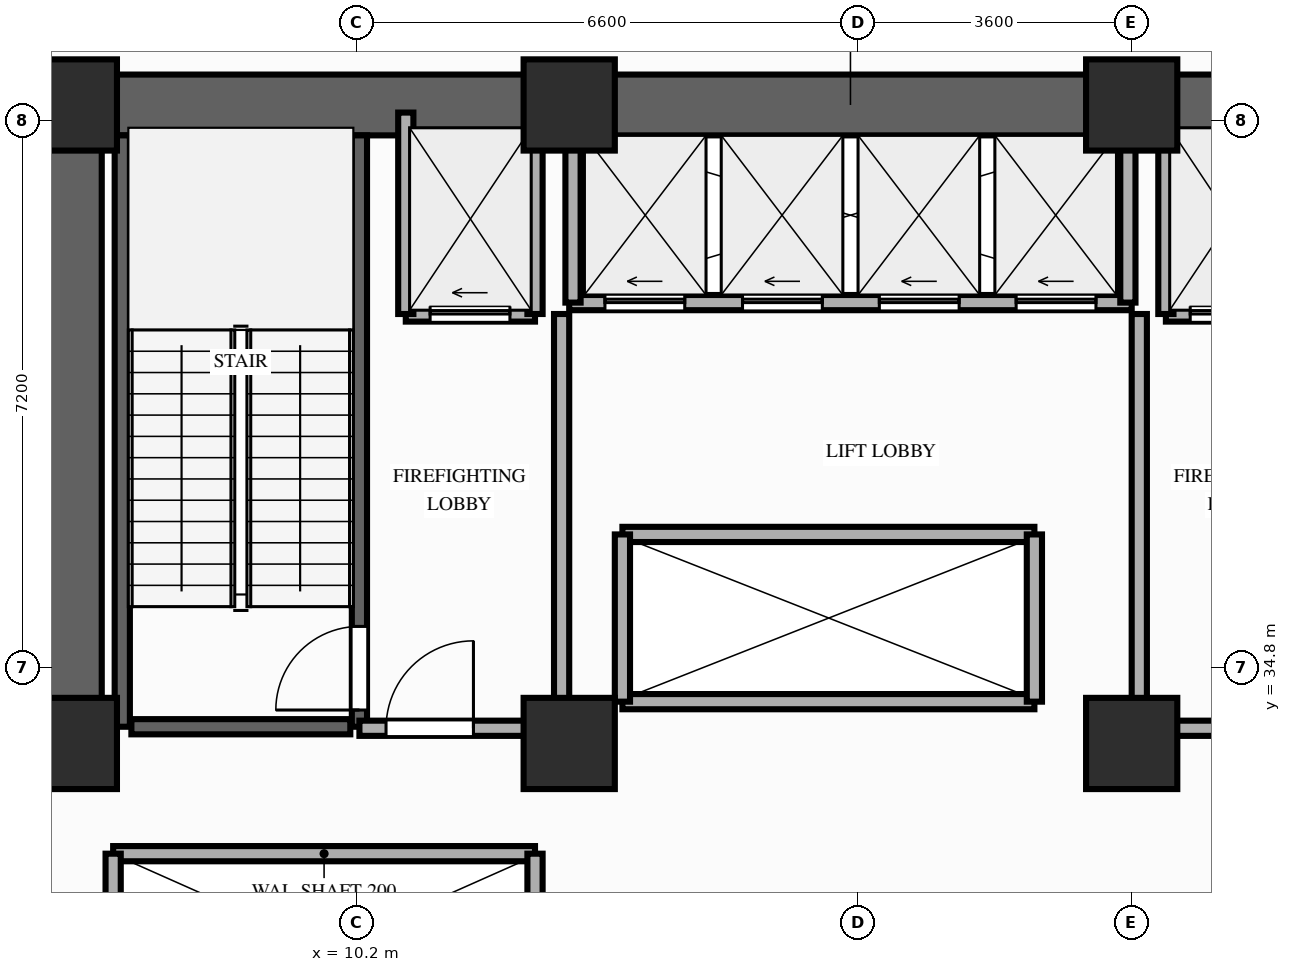
"""IFC4 building model, lengths in metres.
Left out: names, types, materials, properties, quantities, classifications, styles, units other than length and angle.
Written with IfcOpenShell. Run it as: python <this file> out.ifc"""

import sys

from ifc_helpers import new_model, si_unit, direction, frame, frame_2d, origin, origin_2d, place, context, subcontext, project, spatial, rectangle, extrude, element, fill, save


model = new_model("IFC4")
c1 = context("Model", 3, precision=1e-05, world=origin(), true_north=direction((0.0, 1.0)))
c2 = subcontext(c1, "Body", "Model", "MODEL_VIEW")
j1 = project(units=[si_unit("LENGTHUNIT", "METRE"), si_unit("PLANEANGLEUNIT", "RADIAN")], contexts=[c1])
p1 = place(None, origin())
s1 = spatial("IfcSite", under=j1, at=p1, CompositionType="ELEMENT")
p2 = place(p1, origin())
s2 = spatial("IfcBuilding", under=s1, at=p2, CompositionType="ELEMENT")
p3 = place(p2, frame((0.0, 0.0, 21.8)))
s3 = spatial("IfcBuildingStorey", under=s2, at=p3, CompositionType="ELEMENT", Elevation=21.8)
for number, where, z_axis, x_axis in (
    (1, (6.45, 33.8, 0.0), (0.0, 0.0, 1.0), (1.0, 0.0, 0.0)),
    (2, (13.0, 33.8, 0.0), (0.0, 0.0, 1.0), (1.0, 0.0, 0.0)),
    (3, (20.4, 33.8, 0.0), (0.0, 0.0, 1.0), (1.0, 0.0, 0.0)),
    (4, (6.45, 42.2, 0.0), (0.0, 0.0, 1.0), (1.0, 0.0, 0.0)),
    (5, (13.0, 42.2, 0.0), (0.0, 0.0, 1.0), (1.0, 0.0, 0.0)),
    (6, (20.4, 42.2, 0.0), (0.0, 0.0, 1.0), (1.0, 0.0, 0.0)),
):
    element("IfcColumn", number, at=place(p3, frame(where, z_axis=z_axis, x_axis=x_axis)), inside=s3, PredefinedType="COLUMN", context=c2, shape_type="SweptSolid", body=[
        extrude(rectangle(XDim=1.2, YDim=1.2, at=origin_2d()), origin(), (0.0, 0.0, 1.0), 4.6),
    ])
p4 = place(p3, frame((6.45, 42.2, 0.0), z_axis=(0.0, 0.0, 1.0), x_axis=(1.0, 0.0, 0.0)))
e7 = element("IfcWall", 7, at=p4, inside=s3, PredefinedType="SHEAR", context=c2, shape_type="SweptSolid", body=[
    extrude(rectangle(XDim=20.45, YDim=0.8, at=frame_2d((10.225, 0.0))), origin(), (0.0, 0.0, 1.0), 4.36),
])
p5 = place(p3, frame((6.45, 33.8, 0.0), z_axis=(0.0, 0.0, 1.0), x_axis=(0.0, 1.0, 0.0)))
e8 = element("IfcWall", 8, at=p5, inside=s3, PredefinedType="SHEAR", context=c2, shape_type="SweptSolid", body=[
    extrude(rectangle(XDim=7.95, YDim=0.8, at=frame_2d((3.975, 0.0))), origin(), (0.0, 0.0, 1.0), 4.36),
])
p6 = place(p3, frame((7.12, 34.02, 0.0), z_axis=(0.0, 0.0, 1.0), x_axis=(0.0, 1.0, 0.0)))
e9 = element("IfcWall", 9, at=p6, inside=s3, PredefinedType="SHEAR", context=c2, shape_type="SweptSolid", body=[
    extrude(rectangle(XDim=7.78, YDim=0.2, at=frame_2d((3.89, 0.0))), origin(), (0.0, 0.0, 1.0), 4.36),
])
p7 = place(p3, frame((10.24, 34.02, 0.0), z_axis=(0.0, 0.0, 1.0), x_axis=(0.0, 1.0, 0.0)))
e10 = element("IfcWall", 10, at=p7, inside=s3, PredefinedType="SHEAR", context=c2, shape_type="SweptSolid", body=[
    extrude(rectangle(XDim=7.78, YDim=0.2, at=frame_2d((3.89, 0.0))), origin(), (0.0, 0.0, 1.0), 4.36),
])
p8 = place(p7, frame((0.22, 0.0, 0.0)))
e11 = element("IfcOpeningElement", 11, at=p8, cuts=e10, PredefinedType="OPENING", context=c2, shape_type="SweptSolid", body=[
    extrude(rectangle(XDim=1.1, YDim=2.15, at=frame_2d((0.55, 1.075))), frame((0.0, 0.11, 0.0), z_axis=(0.0, -1.0, 0.0), x_axis=(1.0, 0.0, 0.0)), (0.0, 0.0, 1.0), 0.22),
])
p9 = place(p3, frame((7.24, 34.02, 0.0), z_axis=(0.0, 0.0, 1.0), x_axis=(1.0, 0.0, 0.0)))
e12 = element("IfcWall", 12, at=p9, inside=s3, PredefinedType="SHEAR", context=c2, shape_type="SweptSolid", body=[
    extrude(rectangle(XDim=2.88, YDim=0.2, at=frame_2d((1.44, 0.0))), origin(), (0.0, 0.0, 1.0), 4.36),
])
p10 = place(p3, frame((7.0, 32.35, 0.0), z_axis=(0.0, 0.0, 1.0), x_axis=(1.0, 0.0, 0.0)))
e13 = element("IfcWall", 13, at=p10, inside=s3, PredefinedType="MOVABLE", context=c2, shape_type="SweptSolid", body=[
    extrude(rectangle(XDim=5.55, YDim=0.2, at=frame_2d((2.775, 0.0))), origin(), (0.0, 0.0, 1.0), 4.36),
])
for number, where, z_axis, x_axis in (
    (14, (7.0, 29.85, 0.0), (0.0, 0.0, 1.0), (0.0, 1.0, 0.0)),
    (15, (12.55, 29.85, 0.0), (0.0, 0.0, 1.0), (0.0, 1.0, 0.0)),
):
    element("IfcWall", number, at=place(p3, frame(where, z_axis=z_axis, x_axis=x_axis)), inside=s3, PredefinedType="MOVABLE", context=c2, shape_type="SweptSolid", body=[
        extrude(rectangle(XDim=2.5, YDim=0.2, at=frame_2d((1.25, 0.0))), origin(), (0.0, 0.0, 1.0), 4.36),
    ])
p11 = place(p3, frame((10.85, 39.45, 0.0), z_axis=(0.0, 0.0, 1.0), x_axis=(1.0, 0.0, 0.0)))
e16 = element("IfcWall", 16, at=p11, inside=s3, PredefinedType="MOVABLE", context=c2, shape_type="SweptSolid", body=[
    extrude(rectangle(XDim=1.7, YDim=0.2, at=frame_2d((0.85, 0.0))), origin(), (0.0, 0.0, 1.0), 4.36),
])
p12 = place(p11, frame((0.32, 0.0, 0.0)))
e17 = element("IfcOpeningElement", 17, at=p12, cuts=e16, PredefinedType="OPENING", context=c2, shape_type="SweptSolid", body=[
    extrude(rectangle(XDim=1.05, YDim=2.15, at=frame_2d((0.525, 1.075))), frame((0.0, 0.11, 0.0), z_axis=(0.0, -1.0, 0.0), x_axis=(1.0, 0.0, 0.0)), (0.0, 0.0, 1.0), 0.22),
])
p13 = place(p3, frame((20.85, 39.45, 0.0), z_axis=(0.0, 0.0, 1.0), x_axis=(1.0, 0.0, 0.0)))
e18 = element("IfcWall", 18, at=p13, inside=s3, PredefinedType="MOVABLE", context=c2, shape_type="SweptSolid", body=[
    extrude(rectangle(XDim=1.7, YDim=0.2, at=frame_2d((0.85, 0.0))), origin(), (0.0, 0.0, 1.0), 4.36),
])
p14 = place(p13, frame((0.32, 0.0, 0.0)))
e19 = element("IfcOpeningElement", 19, at=p14, cuts=e18, PredefinedType="OPENING", context=c2, shape_type="SweptSolid", body=[
    extrude(rectangle(XDim=1.05, YDim=2.15, at=frame_2d((0.525, 1.075))), frame((0.0, 0.11, 0.0), z_axis=(0.0, -1.0, 0.0), x_axis=(1.0, 0.0, 0.0)), (0.0, 0.0, 1.0), 0.22),
])
for number, where, z_axis, x_axis in (
    (20, (10.85, 39.45, 0.0), (0.0, 0.0, 1.0), (0.0, 1.0, 0.0)),
    (21, (12.55, 39.45, 0.0), (0.0, 0.0, 1.0), (0.0, 1.0, 0.0)),
):
    element("IfcWall", number, at=place(p3, frame(where, z_axis=z_axis, x_axis=x_axis)), inside=s3, PredefinedType="MOVABLE", context=c2, shape_type="SweptSolid", body=[
        extrude(rectangle(XDim=2.65, YDim=0.2, at=frame_2d((1.325, 0.0))), origin(), (0.0, 0.0, 1.0), 3.74),
    ])
p15 = place(p3, frame((12.9, 34.0, 0.0), z_axis=(0.0, 0.0, 1.0), x_axis=(0.0, 1.0, 0.0)))
e22 = element("IfcWall", 22, at=p15, inside=s3, PredefinedType="PARTITIONING", context=c2, shape_type="SweptSolid", body=[
    extrude(rectangle(XDim=5.45, YDim=0.2, at=frame_2d((2.725, 0.0))), origin(), (0.0, 0.0, 1.0), 3.74),
])
p16 = place(p3, frame((10.24, 34.0, 0.0), z_axis=(0.0, 0.0, 1.0), x_axis=(1.0, 0.0, 0.0)))
e23 = element("IfcWall", 23, at=p16, inside=s3, PredefinedType="PARTITIONING", context=c2, shape_type="SweptSolid", body=[
    extrude(rectangle(XDim=2.66, YDim=0.2, at=frame_2d((1.33, 0.0))), origin(), (0.0, 0.0, 1.0), 3.74),
])
p17 = place(p16, frame((0.35, 0.0, 0.0)))
e24 = element("IfcOpeningElement", 24, at=p17, cuts=e23, PredefinedType="OPENING", context=c2, shape_type="SweptSolid", body=[
    extrude(rectangle(XDim=1.15, YDim=2.15, at=frame_2d((0.575, 1.075))), frame((0.0, 0.11, 0.0), z_axis=(0.0, -1.0, 0.0), x_axis=(1.0, 0.0, 0.0)), (0.0, 0.0, 1.0), 0.22),
])
p18 = place(p3, frame((20.85, 39.45, 0.0), z_axis=(0.0, 0.0, 1.0), x_axis=(0.0, 1.0, 0.0)))
e25 = element("IfcWall", 25, at=p18, inside=s3, PredefinedType="MOVABLE", context=c2, shape_type="SweptSolid", body=[
    extrude(rectangle(XDim=2.65, YDim=0.2, at=frame_2d((1.325, 0.0))), origin(), (0.0, 0.0, 1.0), 3.74),
])
p19 = place(p3, frame((20.5, 34.0, 0.0), z_axis=(0.0, 0.0, 1.0), x_axis=(0.0, 1.0, 0.0)))
e26 = element("IfcWall", 26, at=p19, inside=s3, PredefinedType="PARTITIONING", context=c2, shape_type="SweptSolid", body=[
    extrude(rectangle(XDim=5.45, YDim=0.2, at=frame_2d((2.725, 0.0))), origin(), (0.0, 0.0, 1.0), 3.74),
])
p20 = place(p3, frame((20.5, 34.0, 0.0), z_axis=(0.0, 0.0, 1.0), x_axis=(1.0, 0.0, 0.0)))
e27 = element("IfcWall", 27, at=p20, inside=s3, PredefinedType="PARTITIONING", context=c2, shape_type="SweptSolid", body=[
    extrude(rectangle(XDim=2.6, YDim=0.2, at=frame_2d((1.3, 0.0))), origin(), (0.0, 0.0, 1.0), 3.74),
])
p21 = place(p20, frame((1.05, 0.0, 0.0)))
e28 = element("IfcOpeningElement", 28, at=p21, cuts=e27, PredefinedType="OPENING", context=c2, shape_type="SweptSolid", body=[
    extrude(rectangle(XDim=1.15, YDim=2.15, at=frame_2d((0.575, 1.075))), frame((0.0, 0.11, 0.0), z_axis=(0.0, -1.0, 0.0), x_axis=(1.0, 0.0, 0.0)), (0.0, 0.0, 1.0), 0.22),
])
p22 = place(p3, frame((13.0, 39.6, 0.0), z_axis=(0.0, 0.0, 1.0), x_axis=(1.0, 0.0, 0.0)))
e29 = element("IfcWall", 29, at=p22, inside=s3, PredefinedType="MOVABLE", context=c2, shape_type="SweptSolid", body=[
    extrude(rectangle(XDim=7.4, YDim=0.2, at=frame_2d((3.7, 0.0))), origin(), (0.0, 0.0, 1.0), 4.36),
])
p23 = place(p22, frame((0.47, 0.0, 0.0)))
e30 = element("IfcOpeningElement", 30, at=p23, cuts=e29, PredefinedType="OPENING", context=c2, shape_type="SweptSolid", body=[
    extrude(rectangle(XDim=1.05, YDim=2.15, at=frame_2d((0.525, 1.075))), frame((0.0, 0.11, 0.0), z_axis=(0.0, -1.0, 0.0), x_axis=(1.0, 0.0, 0.0)), (0.0, 0.0, 1.0), 0.22),
])
p24 = place(p22, frame((2.28, 0.0, 0.0)))
e31 = element("IfcOpeningElement", 31, at=p24, cuts=e29, PredefinedType="OPENING", context=c2, shape_type="SweptSolid", body=[
    extrude(rectangle(XDim=1.05, YDim=2.15, at=frame_2d((0.525, 1.075))), frame((0.0, 0.11, 0.0), z_axis=(0.0, -1.0, 0.0), x_axis=(1.0, 0.0, 0.0)), (0.0, 0.0, 1.0), 0.22),
])
p25 = place(p22, frame((4.08, 0.0, 0.0)))
e32 = element("IfcOpeningElement", 32, at=p25, cuts=e29, PredefinedType="OPENING", context=c2, shape_type="SweptSolid", body=[
    extrude(rectangle(XDim=1.05, YDim=2.15, at=frame_2d((0.525, 1.075))), frame((0.0, 0.11, 0.0), z_axis=(0.0, -1.0, 0.0), x_axis=(1.0, 0.0, 0.0)), (0.0, 0.0, 1.0), 0.22),
])
p26 = place(p22, frame((5.88, 0.0, 0.0)))
e33 = element("IfcOpeningElement", 33, at=p26, cuts=e29, PredefinedType="OPENING", context=c2, shape_type="SweptSolid", body=[
    extrude(rectangle(XDim=1.05, YDim=2.15, at=frame_2d((0.525, 1.075))), frame((0.0, 0.11, 0.0), z_axis=(0.0, -1.0, 0.0), x_axis=(1.0, 0.0, 0.0)), (0.0, 0.0, 1.0), 0.22),
])
for number, where, z_axis, x_axis in (
    (34, (13.05, 39.6, 0.0), (0.0, 0.0, 1.0), (0.0, 1.0, 0.0)),
    (35, (20.35, 39.6, 0.0), (0.0, 0.0, 1.0), (0.0, 1.0, 0.0)),
):
    element("IfcWall", number, at=place(p3, frame(where, z_axis=z_axis, x_axis=x_axis)), inside=s3, PredefinedType="MOVABLE", context=c2, shape_type="SweptSolid", body=[
        extrude(rectangle(XDim=2.18, YDim=0.2, at=frame_2d((1.09, 0.0))), origin(), (0.0, 0.0, 1.0), 4.36),
    ])
for number, where, z_axis, x_axis in (
    (36, (13.7, 34.35, 0.0), (0.0, 0.0, 1.0), (1.0, 0.0, 0.0)),
    (37, (13.7, 36.55, 0.0), (0.0, 0.0, 1.0), (1.0, 0.0, 0.0)),
):
    element("IfcWall", number, at=place(p3, frame(where, z_axis=z_axis, x_axis=x_axis)), inside=s3, PredefinedType="MOVABLE", context=c2, shape_type="SweptSolid", body=[
        extrude(rectangle(XDim=5.42, YDim=0.2, at=frame_2d((2.71, 0.0))), origin(), (0.0, 0.0, 1.0), 4.36),
    ])
for number, where, z_axis, x_axis in (
    (38, (13.7, 34.35, 0.0), (0.0, 0.0, 1.0), (0.0, 1.0, 0.0)),
    (39, (19.12, 34.35, 0.0), (0.0, 0.0, 1.0), (0.0, 1.0, 0.0)),
):
    element("IfcWall", number, at=place(p3, frame(where, z_axis=z_axis, x_axis=x_axis)), inside=s3, PredefinedType="MOVABLE", context=c2, shape_type="SweptSolid", body=[
        extrude(rectangle(XDim=2.2, YDim=0.2, at=frame_2d((1.1, 0.0))), origin(), (0.0, 0.0, 1.0), 4.36),
    ])
p27 = place(p8, origin())
e40 = element("IfcDoor", 40, at=p27, inside=s3, OperationType="SINGLE_SWING_LEFT", PredefinedType="DOOR", context=c2, shape_type="SweptSolid", body=[
    extrude(rectangle(XDim=1.1, YDim=2.15, at=frame_2d((0.55, 1.075))), frame((0.0, 0.025, 0.0), z_axis=(0.0, -1.0, 0.0), x_axis=(1.0, 0.0, 0.0)), (0.0, 0.0, 1.0), 0.05),
])
fill(e11, e40)
p28 = place(p12, origin())
e41 = element("IfcDoor", 41, at=p28, inside=s3, OperationType="SLIDING_TO_LEFT", PredefinedType="DOOR", context=c2, shape_type="SweptSolid", body=[
    extrude(rectangle(XDim=1.05, YDim=2.15, at=frame_2d((0.525, 1.075))), frame((0.0, 0.025, 0.0), z_axis=(0.0, -1.0, 0.0), x_axis=(1.0, 0.0, 0.0)), (0.0, 0.0, 1.0), 0.05),
])
fill(e17, e41)
p29 = place(p14, origin())
e42 = element("IfcDoor", 42, at=p29, inside=s3, OperationType="SLIDING_TO_LEFT", PredefinedType="DOOR", context=c2, shape_type="SweptSolid", body=[
    extrude(rectangle(XDim=1.05, YDim=2.15, at=frame_2d((0.525, 1.075))), frame((0.0, 0.025, 0.0), z_axis=(0.0, -1.0, 0.0), x_axis=(1.0, 0.0, 0.0)), (0.0, 0.0, 1.0), 0.05),
])
fill(e19, e42)
p30 = place(p17, origin())
e43 = element("IfcDoor", 43, at=p30, inside=s3, OperationType="SINGLE_SWING_RIGHT", PredefinedType="DOOR", context=c2, shape_type="SweptSolid", body=[
    extrude(rectangle(XDim=1.15, YDim=2.15, at=frame_2d((0.575, 1.075))), frame((0.0, 0.025, 0.0), z_axis=(0.0, -1.0, 0.0), x_axis=(1.0, 0.0, 0.0)), (0.0, 0.0, 1.0), 0.05),
])
fill(e24, e43)
p31 = place(p23, origin())
e44 = element("IfcDoor", 44, at=p31, inside=s3, OperationType="SLIDING_TO_LEFT", PredefinedType="DOOR", context=c2, shape_type="SweptSolid", body=[
    extrude(rectangle(XDim=1.05, YDim=2.15, at=frame_2d((0.525, 1.075))), frame((0.0, 0.025, 0.0), z_axis=(0.0, -1.0, 0.0), x_axis=(1.0, 0.0, 0.0)), (0.0, 0.0, 1.0), 0.05),
])
fill(e30, e44)
p32 = place(p24, origin())
e45 = element("IfcDoor", 45, at=p32, inside=s3, OperationType="SLIDING_TO_LEFT", PredefinedType="DOOR", context=c2, shape_type="SweptSolid", body=[
    extrude(rectangle(XDim=1.05, YDim=2.15, at=frame_2d((0.525, 1.075))), frame((0.0, 0.025, 0.0), z_axis=(0.0, -1.0, 0.0), x_axis=(1.0, 0.0, 0.0)), (0.0, 0.0, 1.0), 0.05),
])
fill(e31, e45)
p33 = place(p25, origin())
e46 = element("IfcDoor", 46, at=p33, inside=s3, OperationType="SLIDING_TO_LEFT", PredefinedType="DOOR", context=c2, shape_type="SweptSolid", body=[
    extrude(rectangle(XDim=1.05, YDim=2.15, at=frame_2d((0.525, 1.075))), frame((0.0, 0.025, 0.0), z_axis=(0.0, -1.0, 0.0), x_axis=(1.0, 0.0, 0.0)), (0.0, 0.0, 1.0), 0.05),
])
fill(e32, e46)
p34 = place(p26, origin())
e47 = element("IfcDoor", 47, at=p34, inside=s3, OperationType="SLIDING_TO_LEFT", PredefinedType="DOOR", context=c2, shape_type="SweptSolid", body=[
    extrude(rectangle(XDim=1.05, YDim=2.15, at=frame_2d((0.525, 1.075))), frame((0.0, 0.025, 0.0), z_axis=(0.0, -1.0, 0.0), x_axis=(1.0, 0.0, 0.0)), (0.0, 0.0, 1.0), 0.05),
])
fill(e33, e47)
save(model, sys.argv[1])
